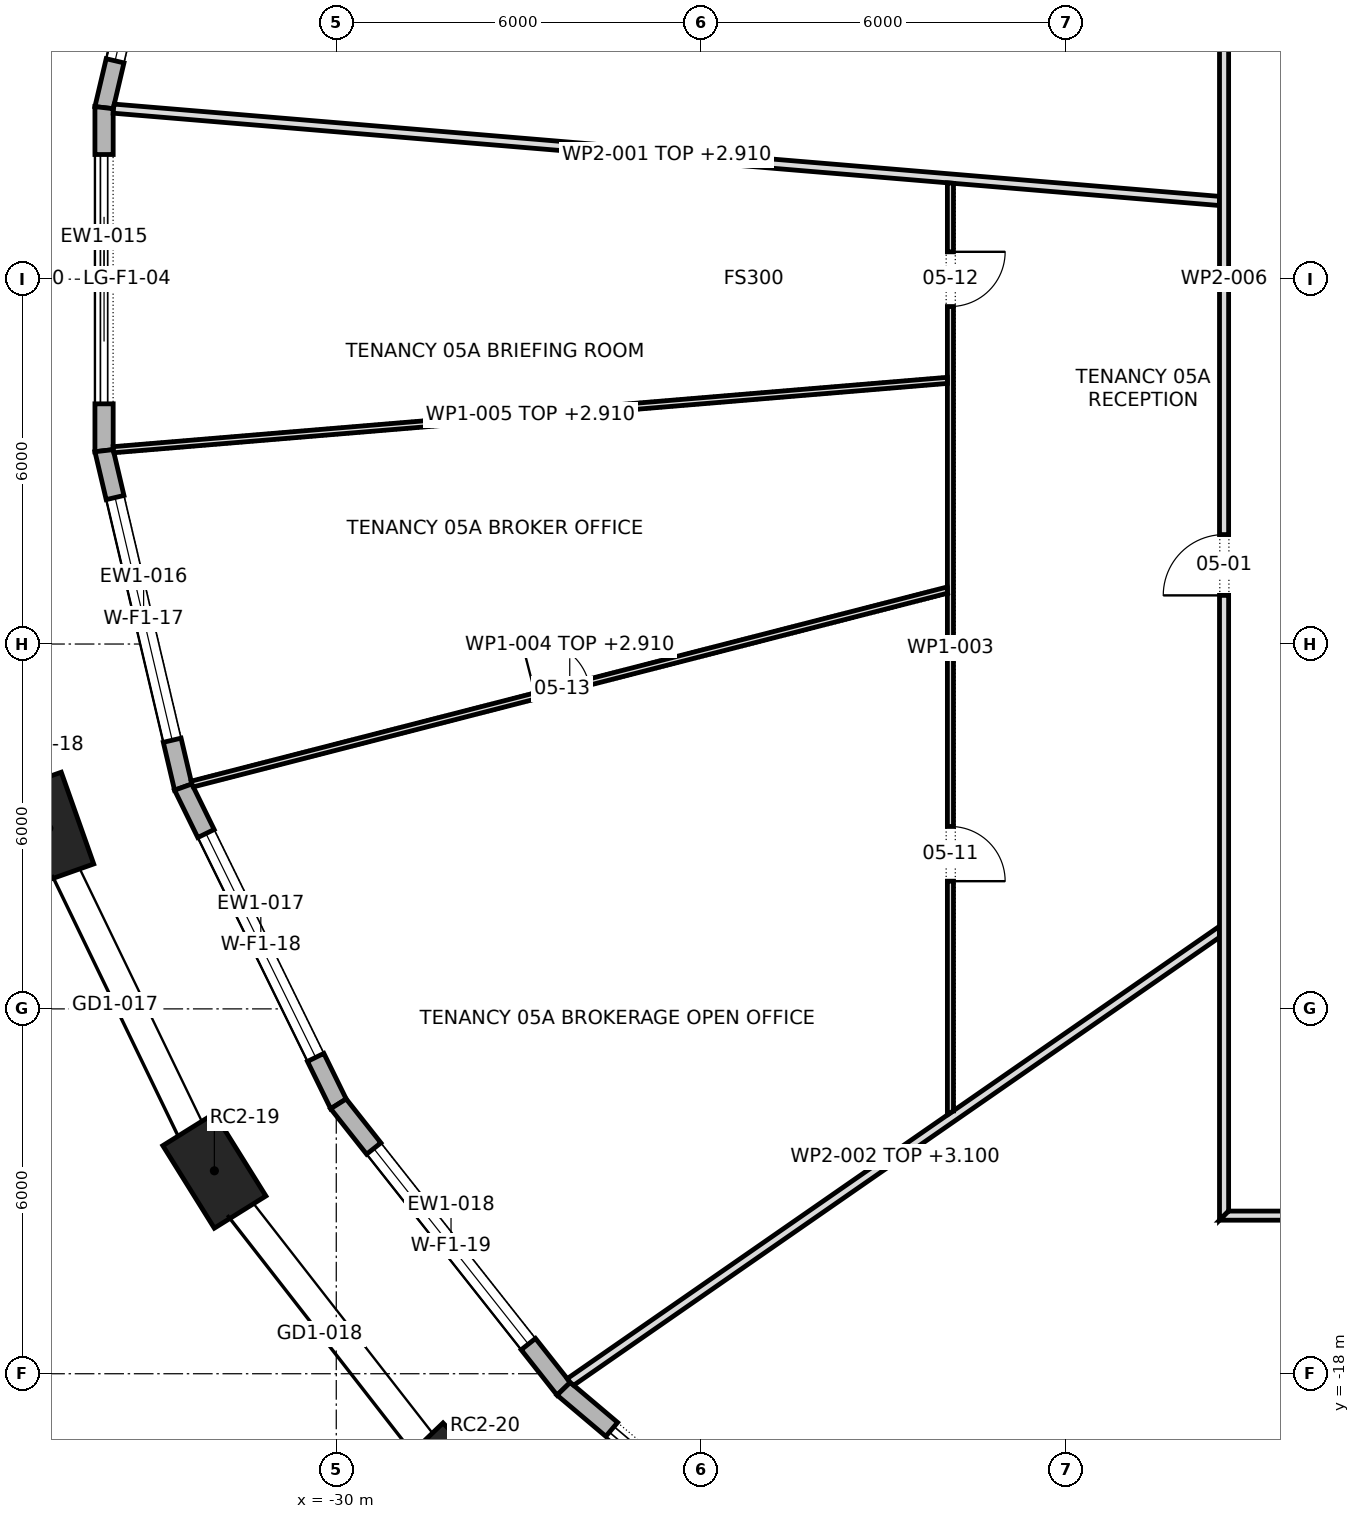
"""IFC4 building model, lengths in metres.
Left out: names, types, materials, properties, quantities, classifications, styles, units other than length and angle.
Written with IfcOpenShell. Run it as: python <this file> out.ifc"""

import sys

from ifc_helpers import new_model, si_unit, direction, frame, frame_2d, origin, origin_2d, place, context, subcontext, project, spatial, polyline, rectangle, outline, extrude, element, fill, save


model = new_model("IFC4")
c1 = context("Model", 3, precision=1e-05, world=origin(), true_north=direction((0.0, 1.0)))
c2 = subcontext(c1, "Body", "Model", "MODEL_VIEW")
j1 = project(units=[si_unit("LENGTHUNIT", "METRE"), si_unit("PLANEANGLEUNIT", "RADIAN")], contexts=[c1])
p1 = place(None, origin())
s1 = spatial("IfcSite", under=j1, at=p1, CompositionType="ELEMENT")
p2 = place(p1, origin())
s2 = spatial("IfcBuilding", under=s1, at=p2, CompositionType="ELEMENT")
p3 = place(p2, frame((0.0, 0.0, 82.3)))
s3 = spatial("IfcBuildingStorey", under=s2, at=p3, CompositionType="ELEMENT", Elevation=82.3)
for number, where, z_axis, x_axis in (
    (1, (-34.727, -9.029, 0.0), (0.0, 0.0, 1.0), (0.334, -0.943, 0.0)),
    (2, (-32.004, -14.663, 0.0), (0.0, 0.0, 1.0), (0.529, -0.849, 0.0)),
    (3, (-28.052, -19.733, 0.0), (0.0, 0.0, 1.0), (0.692, -0.722, 0.0)),
):
    element("IfcColumn", number, at=place(p3, frame(where, z_axis=z_axis, x_axis=x_axis)), inside=s3, PredefinedType="COLUMN", context=c2, shape_type="SweptSolid", body=[
        extrude(rectangle(XDim=1.6, YDim=1.0, at=origin_2d()), origin(), (0.0, 0.0, 1.0), 4.2),
    ])
p4 = place(p3, frame((-32.517, 8.353, 0.0), z_axis=(0.0, 0.0, 1.0), x_axis=(-0.229058489262, -0.97341266095, 0.0)))
e4 = element("IfcWall", 4, at=p4, inside=s3, PredefinedType="STANDARD", context=c2, shape_type="SweptSolid", body=[
    extrude(outline(polyline([(-0.017, -0.15), (5.7, -0.15), (5.666, 0.15), (0.017, 0.15), (-0.017, -0.15)])), origin(), (0.0, 0.0, 1.0), 3.9),
])
p5 = place(p4, frame((0.792, 0.0, 0.6)))
e5 = element("IfcOpeningElement", 5, at=p5, cuts=e4, PredefinedType="OPENING", context=c2, shape_type="SweptSolid", body=[
    extrude(rectangle(XDim=4.1, YDim=2.85, at=frame_2d((2.05, 1.425))), frame((0.0, 0.162, 0.0), z_axis=(0.0, -1.0, 0.0), x_axis=(1.0, 0.0, 0.0)), (0.0, 0.0, 1.0), 0.324),
])
p6 = place(p3, frame((-33.819, 2.821, 0.0), z_axis=(0.0, 0.0, 1.0), x_axis=(0.0, -1.0, 0.0)))
e6 = element("IfcWall", 6, at=p6, inside=s3, PredefinedType="STANDARD", context=c2, shape_type="SweptSolid", body=[
    extrude(outline(polyline([(-0.017, -0.15), (5.658, -0.15), (5.624, 0.15), (0.017, 0.15), (-0.017, -0.15)])), origin(), (0.0, 0.0, 1.0), 3.9),
])
p7 = place(p6, frame((0.771, 0.0, 0.0)))
e7 = element("IfcOpeningElement", 7, at=p7, cuts=e6, PredefinedType="OPENING", context=c2, shape_type="SweptSolid", body=[
    extrude(rectangle(XDim=4.1, YDim=3.45, at=frame_2d((2.05, 1.725))), frame((0.0, 0.162, 0.0), z_axis=(0.0, -1.0, 0.0), x_axis=(1.0, 0.0, 0.0)), (0.0, 0.0, 1.0), 0.324),
])
p8 = place(p3, frame((-33.819, -2.821, 0.0), z_axis=(0.0, 0.0, 1.0), x_axis=(0.229058489262, -0.97341266095, 0.0)))
e8 = element("IfcWall", 8, at=p8, inside=s3, PredefinedType="STANDARD", context=c2, shape_type="SweptSolid", body=[
    extrude(outline(polyline([(-0.017, -0.15), (5.7, -0.15), (5.666, 0.15), (0.017, 0.15), (-0.017, -0.15)])), origin(), (0.0, 0.0, 1.0), 3.9),
])
p9 = place(p8, frame((0.792, 0.0, 0.6)))
e9 = element("IfcOpeningElement", 9, at=p9, cuts=e8, PredefinedType="OPENING", context=c2, shape_type="SweptSolid", body=[
    extrude(rectangle(XDim=4.1, YDim=2.85, at=frame_2d((2.05, 1.425))), frame((0.0, 0.162, 0.0), z_axis=(0.0, -1.0, 0.0), x_axis=(1.0, 0.0, 0.0)), (0.0, 0.0, 1.0), 0.324),
])
p10 = place(p3, frame((-32.517, -8.353, 0.0), z_axis=(0.0, 0.0, 1.0), x_axis=(0.440027465772, -0.897984314655, 0.0)))
e10 = element("IfcWall", 10, at=p10, inside=s3, PredefinedType="STANDARD", context=c2, shape_type="SweptSolid", body=[
    extrude(outline(polyline([(-0.017, -0.15), (5.817, -0.15), (5.785, 0.15), (0.017, 0.15), (-0.017, -0.15)])), origin(), (0.0, 0.0, 1.0), 3.9),
])
p11 = place(p10, frame((0.85, 0.0, 0.6)))
e11 = element("IfcOpeningElement", 11, at=p11, cuts=e10, PredefinedType="OPENING", context=c2, shape_type="SweptSolid", body=[
    extrude(rectangle(XDim=4.1, YDim=2.85, at=frame_2d((2.05, 1.425))), frame((0.0, 0.162, 0.0), z_axis=(0.0, -1.0, 0.0), x_axis=(1.0, 0.0, 0.0)), (0.0, 0.0, 1.0), 0.324),
])
p12 = place(p3, frame((-29.964, -13.562, 0.0), z_axis=(0.0, 0.0, 1.0), x_axis=(0.620093447965, -0.784527957303, 0.0)))
e12 = element("IfcWall", 12, at=p12, inside=s3, PredefinedType="STANDARD", context=c2, shape_type="SweptSolid", body=[
    extrude(outline(polyline([(-0.016, -0.15), (5.988, -0.15), (5.958, 0.15), (0.016, 0.15), (-0.016, -0.15)])), origin(), (0.0, 0.0, 1.0), 3.9),
])
p13 = place(p12, frame((0.937, 0.0, 0.6)))
e13 = element("IfcOpeningElement", 13, at=p13, cuts=e12, PredefinedType="OPENING", context=c2, shape_type="SweptSolid", body=[
    extrude(rectangle(XDim=4.1, YDim=2.85, at=frame_2d((2.05, 1.425))), frame((0.0, 0.162, 0.0), z_axis=(0.0, -1.0, 0.0), x_axis=(1.0, 0.0, 0.0)), (0.0, 0.0, 1.0), 0.324),
])
p14 = place(p3, frame((-26.26, -18.248, 0.0), z_axis=(0.0, 0.0, 1.0), x_axis=(0.763693886759, -0.645578536916, 0.0)))
e14 = element("IfcWall", 14, at=p14, inside=s3, PredefinedType="STANDARD", context=c2, shape_type="SweptSolid", body=[
    extrude(outline(polyline([(-0.015, -0.15), (6.184, -0.15), (6.156, 0.15), (0.015, 0.15), (-0.015, -0.15)])), origin(), (0.0, 0.0, 1.0), 3.9),
])
p15 = place(p14, frame((1.035, 0.0, 0.0)))
e15 = element("IfcOpeningElement", 15, at=p15, cuts=e14, PredefinedType="OPENING", context=c2, shape_type="SweptSolid", body=[
    extrude(rectangle(XDim=4.1, YDim=3.45, at=frame_2d((2.05, 1.725))), frame((0.0, 0.162, 0.0), z_axis=(0.0, -1.0, 0.0), x_axis=(1.0, 0.0, 0.0)), (0.0, 0.0, 1.0), 0.324),
])
p16 = place(p3, frame((-33.662, 2.804, 0.0), z_axis=(0.0, 0.0, 1.0), x_axis=(0.996534589799, -0.083179392484, 0.0)))
e16 = element("IfcWall", 16, at=p16, inside=s3, PredefinedType="PARTITIONING", context=c2, shape_type="SweptSolid", body=[
    extrude(outline(polyline([(18.256, -0.075), (18.256, -0.069), (18.244, 0.075), (16.42, 0.075), (14.596, 0.075), (12.773, 0.075), (10.949, 0.075), (9.125, 0.075), (7.301, 0.075), (5.477, 0.075), (3.653, 0.075), (1.829, 0.075), (0.005, 0.075), (0.0, 0.04), (0.0, -0.075), (1.826, -0.075), (3.651, -0.075), (5.477, -0.075), (7.302, -0.075), (9.128, -0.075), (10.954, -0.075), (12.78, -0.075), (14.605, -0.075), (16.431, -0.075), (18.256, -0.075)])), origin(), (0.0, 0.0, 1.0), 2.91),
])
p17 = place(p3, frame((-26.158, -18.142, 0.0), z_axis=(0.0, 0.0, 1.0), x_axis=(0.821670699987, 0.569962508226, 0.0)))
e17 = element("IfcWall", 17, at=p17, inside=s3, PredefinedType="PARTITIONING", context=c2, shape_type="SweptSolid", body=[
    extrude(outline(polyline([(0.024, -0.075), (1.87, -0.075), (3.717, -0.075), (5.563, -0.075), (7.41, -0.075), (9.257, -0.075), (11.103, -0.075), (12.95, -0.075), (13.003, 0.002), (13.003, 0.002), (13.053, 0.074), (13.053, 0.075), (11.279, 0.075), (9.504, 0.075), (7.729, 0.075), (7.728, 0.073), (7.726, 0.075), (5.794, 0.075), (3.863, 0.075), (1.931, 0.075), (0.0, 0.075), (0.0, 0.073), (0.005, -0.004), (0.024, -0.075)])), origin(), (0.0, 0.0, 1.0), 3.1),
])
p18 = place(p3, frame((-19.9, -13.744, 0.0), z_axis=(0.0, 0.0, 1.0), x_axis=(0.0, 1.0, 0.0)))
e18 = element("IfcWall", 18, at=p18, inside=s3, PredefinedType="PARTITIONING", context=c2, shape_type="SweptSolid", body=[
    extrude(outline(polyline([(0.069, -0.05), (1.976, -0.05), (3.882, -0.05), (5.788, -0.05), (7.695, -0.05), (9.601, -0.05), (11.508, -0.05), (13.414, -0.05), (15.321, -0.05), (15.329, 0.049), (15.329, 0.05), (13.644, 0.05), (11.958, 0.05), (10.273, 0.05), (8.588, 0.05), (8.58, 0.048), (8.58, 0.05), (6.864, 0.05), (5.148, 0.05), (3.432, 0.05), (1.716, 0.05), (0.0, 0.05), (0.0, 0.05), (0.069, -0.05)])), origin(), (0.0, 0.0, 1.0), 3.9),
])
p19 = place(p18, frame((3.844, 0.0, 0.0)))
e19 = element("IfcOpeningElement", 19, at=p19, cuts=e18, PredefinedType="OPENING", context=c2, shape_type="SweptSolid", body=[
    extrude(rectangle(XDim=0.9, YDim=2.1, at=frame_2d((0.45, 1.05))), frame((0.0, 0.062, 0.0), z_axis=(0.0, -1.0, 0.0), x_axis=(1.0, 0.0, 0.0)), (0.0, 0.0, 1.0), 0.124),
])
p20 = place(p18, frame((13.294, 0.0, 0.0)))
e20 = element("IfcOpeningElement", 20, at=p20, cuts=e18, PredefinedType="OPENING", context=c2, shape_type="SweptSolid", body=[
    extrude(rectangle(XDim=0.9, YDim=2.1, at=frame_2d((0.45, 1.05))), frame((0.0, 0.062, 0.0), z_axis=(0.0, -1.0, 0.0), x_axis=(1.0, 0.0, 0.0)), (0.0, 0.0, 1.0), 0.124),
])
p21 = place(p3, frame((-19.938, -5.11, 0.0), z_axis=(0.0, 0.0, 1.0), x_axis=(-0.96855855203, -0.248785713594, 0.0)))
e21 = element("IfcWall", 21, at=p21, inside=s3, PredefinedType="PARTITIONING", context=c2, shape_type="SweptSolid", body=[
    extrude(outline(polyline([(12.839, -0.05), (12.839, 0.005), (12.829, 0.05), (11.0, 0.05), (9.171, 0.05), (7.342, 0.05), (5.513, 0.05), (3.684, 0.05), (1.855, 0.05), (0.025, 0.05), (0.0, -0.049), (0.0, -0.05), (1.834, -0.05), (3.668, -0.05), (5.502, -0.05), (7.336, -0.05), (9.17, -0.05), (11.005, -0.05), (12.839, -0.05)])), origin(), (0.0, 0.0, 1.0), 2.91),
])
p22 = place(p21, frame((6.103, 0.0, 0.0)))
e22 = element("IfcOpeningElement", 22, at=p22, cuts=e21, PredefinedType="OPENING", context=c2, shape_type="SweptSolid", body=[
    extrude(rectangle(XDim=0.9, YDim=2.1, at=frame_2d((0.45, 1.05))), frame((0.0, 0.062, 0.0), z_axis=(0.0, -1.0, 0.0), x_axis=(1.0, 0.0, 0.0)), (0.0, 0.0, 1.0), 0.124),
])
p23 = place(p3, frame((-19.946, -1.664, 0.0), z_axis=(0.0, 0.0, 1.0), x_axis=(-0.996559566172, -0.082879617945, 0.0)))
e23 = element("IfcWall", 23, at=p23, inside=s3, PredefinedType="PARTITIONING", context=c2, shape_type="SweptSolid", body=[
    extrude(outline(polyline([(13.765, -0.05), (13.765, 0.026), (13.762, 0.05), (11.797, 0.05), (9.832, 0.05), (7.867, 0.05), (5.902, 0.05), (3.938, 0.05), (1.973, 0.05), (0.008, 0.05), (0.0, -0.045), (0.0, -0.05), (1.967, -0.05), (3.933, -0.05), (5.899, -0.05), (7.866, -0.05), (9.833, -0.05), (11.799, -0.05), (13.765, -0.05)])), origin(), (0.0, 0.0, 1.0), 2.91),
])
p24 = place(p3, frame((-15.4, -15.475, 0.0), z_axis=(0.0, 0.0, 1.0), x_axis=(0.0, 1.0, 0.0)))
e24 = element("IfcWall", 24, at=p24, inside=s3, PredefinedType="PARTITIONING", context=c2, shape_type="SweptSolid", body=[
    extrude(outline(polyline([(0.15, -0.075), (2.066, -0.075), (3.981, -0.075), (5.897, -0.075), (7.812, -0.075), (9.728, -0.075), (11.644, -0.075), (13.56, -0.075), (15.475, -0.075), (17.391, -0.075), (19.306, -0.075), (21.222, -0.075), (23.138, -0.075), (25.053, -0.075), (26.969, -0.075), (28.885, -0.075), (30.8, -0.075), (30.95, 0.075), (29.016, 0.075), (27.081, 0.075), (25.147, 0.075), (23.212, 0.075), (21.278, 0.075), (19.344, 0.075), (17.409, 0.075), (15.475, 0.075), (13.541, 0.075), (11.606, 0.075), (9.672, 0.075), (7.738, 0.075), (5.803, 0.075), (3.869, 0.075), (1.935, 0.075), (0.0, 0.075), (0.15, -0.075)])), origin(), (0.0, 0.0, 1.0), 3.9),
])
p25 = place(p24, frame((10.275, 0.0, 0.0)))
e25 = element("IfcOpeningElement", 25, at=p25, cuts=e24, PredefinedType="OPENING", context=c2, shape_type="SweptSolid", body=[
    extrude(rectangle(XDim=1.0, YDim=2.1, at=frame_2d((0.5, 1.05))), frame((0.0, 0.087, 0.0), z_axis=(0.0, -1.0, 0.0), x_axis=(1.0, 0.0, 0.0)), (0.0, 0.0, 1.0), 0.174),
])
p26 = place(p24, frame((22.915, 0.0, 0.0)))
e26 = element("IfcOpeningElement", 26, at=p26, cuts=e24, PredefinedType="OPENING", context=c2, shape_type="SweptSolid", body=[
    extrude(rectangle(XDim=1.8, YDim=2.1, at=frame_2d((0.9, 1.05))), frame((0.0, 0.087, 0.0), z_axis=(0.0, -1.0, 0.0), x_axis=(1.0, 0.0, 0.0)), (0.0, 0.0, 1.0), 0.174),
])
p27 = place(p3, frame((-15.475, -15.4, 0.0), z_axis=(0.0, 0.0, 1.0), x_axis=(1.0, 0.0, 0.0)))
e27 = element("IfcWall", 27, at=p27, inside=s3, PredefinedType="PARTITIONING", context=c2, shape_type="SweptSolid", body=[
    extrude(outline(polyline([(0.0, -0.075), (1.935, -0.075), (3.869, -0.075), (5.803, -0.075), (7.738, -0.075), (9.672, -0.075), (11.606, -0.075), (13.541, -0.075), (15.475, -0.075), (17.409, -0.075), (19.344, -0.075), (21.278, -0.075), (23.212, -0.075), (25.147, -0.075), (27.081, -0.075), (29.016, -0.075), (30.95, -0.075), (30.8, 0.075), (28.885, 0.075), (26.969, 0.075), (25.053, 0.075), (23.138, 0.075), (21.222, 0.075), (19.306, 0.075), (17.391, 0.075), (15.475, 0.075), (13.56, 0.075), (11.644, 0.075), (9.728, 0.075), (7.812, 0.075), (5.897, 0.075), (3.981, 0.075), (2.066, 0.075), (0.15, 0.075), (0.0, -0.075)])), origin(), (0.0, 0.0, 1.0), 3.9),
])
p28 = place(p27, frame((2.405, 0.0, 0.0)))
e28 = element("IfcOpeningElement", 28, at=p28, cuts=e27, PredefinedType="OPENING", context=c2, shape_type="SweptSolid", body=[
    extrude(rectangle(XDim=1.0, YDim=2.1, at=frame_2d((0.5, 1.05))), frame((0.0, 0.087, 0.0), z_axis=(0.0, -1.0, 0.0), x_axis=(1.0, 0.0, 0.0)), (0.0, 0.0, 1.0), 0.174),
])
p29 = place(p27, frame((12.47, 0.0, 0.0)))
e29 = element("IfcOpeningElement", 29, at=p29, cuts=e27, PredefinedType="OPENING", context=c2, shape_type="SweptSolid", body=[
    extrude(rectangle(XDim=1.8, YDim=2.1, at=frame_2d((0.9, 1.05))), frame((0.0, 0.087, 0.0), z_axis=(0.0, -1.0, 0.0), x_axis=(1.0, 0.0, 0.0)), (0.0, 0.0, 1.0), 0.174),
])
p30 = place(p27, frame((25.04, 0.0, 0.0)))
e30 = element("IfcOpeningElement", 30, at=p30, cuts=e27, PredefinedType="OPENING", context=c2, shape_type="SweptSolid", body=[
    extrude(rectangle(XDim=1.8, YDim=2.1, at=frame_2d((0.9, 1.05))), frame((0.0, 0.087, 0.0), z_axis=(0.0, -1.0, 0.0), x_axis=(1.0, 0.0, 0.0)), (0.0, 0.0, 1.0), 0.174),
])
p31 = place(p3, frame((-9.762, -15.435, 0.0), z_axis=(0.0, 0.0, 1.0), x_axis=(-0.534199196173, -0.845358633249, 0.0)))
e31 = element("IfcWall", 31, at=p31, inside=s3, PredefinedType="PARTITIONING", context=c2, shape_type="SweptSolid", body=[
    extrude(outline(polyline([(11.581, -0.075), (11.581, -0.066), (11.578, -0.001), (11.56, 0.075), (9.633, 0.075), (7.707, 0.075), (5.78, 0.075), (3.853, 0.075), (1.927, 0.075), (0.0, 0.075), (0.0, 0.075), (0.095, -0.075), (2.009, -0.075), (3.923, -0.075), (5.838, -0.075), (7.752, -0.075), (9.667, -0.075), (11.581, -0.075)])), origin(), (0.0, 0.0, 1.0), 3.147),
])
p32 = place(p5, origin())
e32 = element("IfcWindow", 32, at=p32, inside=s3, PartitioningType="TRIPLE_PANEL_VERTICAL", PredefinedType="WINDOW", context=c2, shape_type="SweptSolid", body=[
    extrude(rectangle(XDim=4.1, YDim=2.85, at=frame_2d((2.05, 1.425))), frame((0.0, 0.03, 0.0), z_axis=(0.0, -1.0, 0.0), x_axis=(1.0, 0.0, 0.0)), (0.0, 0.0, 1.0), 0.06),
])
fill(e5, e32)
p33 = place(p7, origin())
e33 = element("IfcDoor", 33, at=p33, inside=s3, OperationType="DOUBLE_DOOR_SLIDING", PredefinedType="DOOR", context=c2, shape_type="SweptSolid", body=[
    extrude(rectangle(XDim=4.1, YDim=3.45, at=frame_2d((2.05, 1.725))), frame((0.0, 0.025, 0.0), z_axis=(0.0, -1.0, 0.0), x_axis=(1.0, 0.0, 0.0)), (0.0, 0.0, 1.0), 0.05),
])
fill(e7, e33)
p34 = place(p9, origin())
e34 = element("IfcWindow", 34, at=p34, inside=s3, PartitioningType="TRIPLE_PANEL_VERTICAL", PredefinedType="WINDOW", context=c2, shape_type="SweptSolid", body=[
    extrude(rectangle(XDim=4.1, YDim=2.85, at=frame_2d((2.05, 1.425))), frame((0.0, 0.03, 0.0), z_axis=(0.0, -1.0, 0.0), x_axis=(1.0, 0.0, 0.0)), (0.0, 0.0, 1.0), 0.06),
])
fill(e9, e34)
p35 = place(p11, origin())
e35 = element("IfcWindow", 35, at=p35, inside=s3, PartitioningType="TRIPLE_PANEL_VERTICAL", PredefinedType="WINDOW", context=c2, shape_type="SweptSolid", body=[
    extrude(rectangle(XDim=4.1, YDim=2.85, at=frame_2d((2.05, 1.425))), frame((0.0, 0.03, 0.0), z_axis=(0.0, -1.0, 0.0), x_axis=(1.0, 0.0, 0.0)), (0.0, 0.0, 1.0), 0.06),
])
fill(e11, e35)
p36 = place(p13, origin())
e36 = element("IfcWindow", 36, at=p36, inside=s3, PartitioningType="TRIPLE_PANEL_VERTICAL", PredefinedType="WINDOW", context=c2, shape_type="SweptSolid", body=[
    extrude(rectangle(XDim=4.1, YDim=2.85, at=frame_2d((2.05, 1.425))), frame((0.0, 0.03, 0.0), z_axis=(0.0, -1.0, 0.0), x_axis=(1.0, 0.0, 0.0)), (0.0, 0.0, 1.0), 0.06),
])
fill(e13, e36)
p37 = place(p15, origin())
e37 = element("IfcDoor", 37, at=p37, inside=s3, OperationType="DOUBLE_DOOR_SLIDING", PredefinedType="DOOR", context=c2, shape_type="SweptSolid", body=[
    extrude(rectangle(XDim=4.1, YDim=3.45, at=frame_2d((2.05, 1.725))), frame((0.0, 0.025, 0.0), z_axis=(0.0, -1.0, 0.0), x_axis=(1.0, 0.0, 0.0)), (0.0, 0.0, 1.0), 0.05),
])
fill(e15, e37)
p38 = place(p25, origin())
e38 = element("IfcDoor", 38, at=p38, inside=s3, OperationType="SINGLE_SWING_RIGHT", PredefinedType="DOOR", context=c2, shape_type="SweptSolid", body=[
    extrude(rectangle(XDim=1.0, YDim=2.1, at=frame_2d((0.5, 1.05))), frame((0.0, 0.025, 0.0), z_axis=(0.0, -1.0, 0.0), x_axis=(1.0, 0.0, 0.0)), (0.0, 0.0, 1.0), 0.05),
])
fill(e25, e38)
p39 = place(p19, frame((0.9, 0.0, 0.0), z_axis=(0.0, 0.0, 1.0), x_axis=(-1.0, 0.0, 0.0)))
e39 = element("IfcDoor", 39, at=p39, inside=s3, OperationType="SINGLE_SWING_LEFT", PredefinedType="DOOR", context=c2, shape_type="SweptSolid", body=[
    extrude(rectangle(XDim=0.9, YDim=2.1, at=frame_2d((0.45, 1.05))), frame((0.0, 0.025, 0.0), z_axis=(0.0, -1.0, 0.0), x_axis=(1.0, 0.0, 0.0)), (0.0, 0.0, 1.0), 0.05),
])
fill(e19, e39)
p40 = place(p20, frame((0.9, 0.0, 0.0), z_axis=(0.0, 0.0, 1.0), x_axis=(-1.0, 0.0, 0.0)))
e40 = element("IfcDoor", 40, at=p40, inside=s3, OperationType="SINGLE_SWING_RIGHT", PredefinedType="DOOR", context=c2, shape_type="SweptSolid", body=[
    extrude(rectangle(XDim=0.9, YDim=2.1, at=frame_2d((0.45, 1.05))), frame((0.0, 0.025, 0.0), z_axis=(0.0, -1.0, 0.0), x_axis=(1.0, 0.0, 0.0)), (0.0, 0.0, 1.0), 0.05),
])
fill(e20, e40)
p41 = place(p22, frame((0.9, 0.0, 0.0), z_axis=(0.0, 0.0, 1.0), x_axis=(-1.0, 0.0, 0.0)))
e41 = element("IfcDoor", 41, at=p41, inside=s3, OperationType="SINGLE_SWING_RIGHT", PredefinedType="DOOR", context=c2, shape_type="SweptSolid", body=[
    extrude(rectangle(XDim=0.9, YDim=2.1, at=frame_2d((0.45, 1.05))), frame((0.0, 0.025, 0.0), z_axis=(0.0, -1.0, 0.0), x_axis=(1.0, 0.0, 0.0)), (0.0, 0.0, 1.0), 0.05),
])
fill(e22, e41)
save(model, sys.argv[1])
